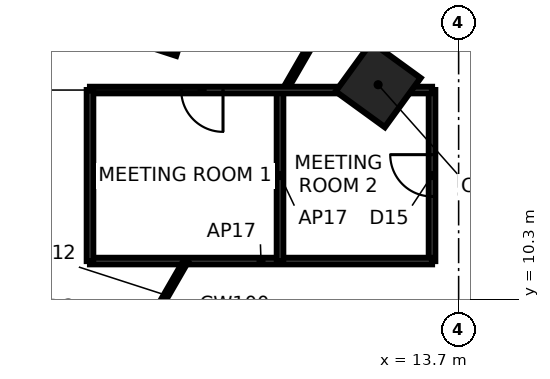
"""IFC4 building model, lengths in metres.
Left out: names, types, materials, properties, quantities, classifications, styles, units other than length and angle.
Written with IfcOpenShell. Run it as: python <this file> out.ifc"""

import sys

from ifc_helpers import new_model, si_unit, direction, frame, frame_2d, origin, origin_2d, place, context, subcontext, project, spatial, rectangle, extrude, element, fill, save


model = new_model("IFC4")
c1 = context("Model", 3, precision=1e-05, world=origin(), true_north=direction((0.0, 1.0)))
c2 = subcontext(c1, "Body", "Model", "MODEL_VIEW")
j1 = project(units=[si_unit("LENGTHUNIT", "METRE"), si_unit("PLANEANGLEUNIT", "RADIAN")], contexts=[c1])
p1 = place(None, origin())
s1 = spatial("IfcSite", under=j1, at=p1, CompositionType="ELEMENT")
p2 = place(p1, origin())
s2 = spatial("IfcBuilding", under=s1, at=p2, CompositionType="ELEMENT")
p3 = place(p2, frame((0.0, 0.0, 135.3)))
s3 = spatial("IfcBuildingStorey", under=s2, at=p3, CompositionType="ELEMENT", Elevation=135.3)
for number, where, z_axis, x_axis in (
    (1, (11.581, 15.94, 0.0), (0.0, 0.0, 1.0), (0.588, 0.809, 0.0)),
    (2, (5.754, 17.708, 0.0), (0.0, 0.0, 1.0), (0.309, 0.951, 0.0)),
):
    element("IfcColumn", number, at=place(p3, frame(where, z_axis=z_axis, x_axis=x_axis)), inside=s3, PredefinedType="COLUMN", context=c2, shape_type="SweptSolid", body=[
        extrude(rectangle(XDim=1.6, YDim=1.6, at=origin_2d()), origin(), (0.0, 0.0, 1.0), 3.9),
    ])
p4 = place(p3, frame((13.0, 11.3, 0.0), z_axis=(0.0, 0.0, 1.0), x_axis=(0.0, 1.0, 0.0)))
e3 = element("IfcWall", 3, at=p4, inside=s3, PredefinedType="PARTITIONING", context=c2, shape_type="SweptSolid", body=[
    extrude(rectangle(XDim=4.5, YDim=0.17, at=frame_2d((2.25, 0.0))), origin(), (0.0, 0.0, 1.0), 3.74),
])
p5 = place(p4, frame((1.7, 0.0, 0.0)))
e4 = element("IfcOpeningElement", 4, at=p5, cuts=e3, PredefinedType="OPENING", context=c2, shape_type="SweptSolid", body=[
    extrude(rectangle(XDim=1.1, YDim=2.4, at=frame_2d((0.55, 1.2))), frame((0.0, 0.095, 0.0), z_axis=(0.0, -1.0, 0.0), x_axis=(1.0, 0.0, 0.0)), (0.0, 0.0, 1.0), 0.19),
])
p6 = place(p3, frame((4.0, 11.3, 0.0), z_axis=(0.0, 0.0, 1.0), x_axis=(1.0, 0.0, 0.0)))
e5 = element("IfcWall", 5, at=p6, inside=s3, PredefinedType="PARTITIONING", context=c2, shape_type="SweptSolid", body=[
    extrude(rectangle(XDim=9.0, YDim=0.17, at=frame_2d((4.5, 0.0))), origin(), (0.0, 0.0, 1.0), 3.74),
])
p7 = place(p3, frame((9.0, 15.8, 0.0), z_axis=(0.0, 0.0, 1.0), x_axis=(0.0, -1.0, 0.0)))
e6 = element("IfcWall", 6, at=p7, inside=s3, PredefinedType="PARTITIONING", context=c2, shape_type="SweptSolid", body=[
    extrude(rectangle(XDim=4.5, YDim=0.17, at=frame_2d((2.25, 0.0))), origin(), (0.0, 0.0, 1.0), 3.74),
])
p8 = place(p3, frame((11.137, 19.289, 0.0), z_axis=(0.0, 0.0, 1.0), x_axis=(-0.500023174947, -0.866012023309, 0.0)))
e7 = element("IfcWall", 7, at=p8, inside=s3, PredefinedType="PARTITIONING", context=c2, shape_type="SweptSolid", body=[
    extrude(rectangle(XDim=4.029, YDim=0.12, at=frame_2d((2.015, 0.0))), origin(), (0.0, 0.0, 1.0), 3.74),
])
p9 = place(p3, frame((6.524, 11.3, 0.0), z_axis=(0.0, 0.0, 1.0), x_axis=(-0.499929208183, -0.866066271601, 0.0)))
e8 = element("IfcWall", 8, at=p9, inside=s3, PredefinedType="PARTITIONING", context=c2, shape_type="SweptSolid", body=[
    extrude(rectangle(XDim=2.078, YDim=0.12, at=frame_2d((1.039, 0.0))), origin(), (0.0, 0.0, 1.0), 3.74),
])
p10 = place(p3, frame((13.0, 15.8, 0.0), z_axis=(0.0, 0.0, 1.0), x_axis=(-1.0, 0.0, 0.0)))
e9 = element("IfcWall", 9, at=p10, inside=s3, PredefinedType="PARTITIONING", context=c2, shape_type="SweptSolid", body=[
    extrude(rectangle(XDim=9.0, YDim=0.17, at=frame_2d((4.5, 0.0))), origin(), (0.0, 0.0, 1.0), 3.74),
])
p11 = place(p10, frame((5.5, 0.0, 0.0)))
e10 = element("IfcOpeningElement", 10, at=p11, cuts=e9, PredefinedType="OPENING", context=c2, shape_type="SweptSolid", body=[
    extrude(rectangle(XDim=1.1, YDim=2.4, at=frame_2d((0.55, 1.2))), frame((0.0, 0.095, 0.0), z_axis=(0.0, -1.0, 0.0), x_axis=(1.0, 0.0, 0.0)), (0.0, 0.0, 1.0), 0.19),
])
p12 = place(p3, frame((4.0, 15.8, 0.0), z_axis=(0.0, 0.0, 1.0), x_axis=(0.0, -1.0, 0.0)))
e11 = element("IfcWall", 11, at=p12, inside=s3, PredefinedType="PARTITIONING", context=c2, shape_type="SweptSolid", body=[
    extrude(rectangle(XDim=4.5, YDim=0.17, at=frame_2d((2.25, 0.0))), origin(), (0.0, 0.0, 1.0), 3.74),
])
p13 = place(p11, origin())
e12 = element("IfcDoor", 12, at=p13, inside=s3, OperationType="SINGLE_SWING_LEFT", PredefinedType="DOOR", context=c2, shape_type="SweptSolid", body=[
    extrude(rectangle(XDim=1.1, YDim=2.4, at=frame_2d((0.55, 1.2))), frame((0.0, 0.025, 0.0), z_axis=(0.0, -1.0, 0.0), x_axis=(1.0, 0.0, 0.0)), (0.0, 0.0, 1.0), 0.05),
])
fill(e10, e12)
p14 = place(p5, origin())
e13 = element("IfcDoor", 13, at=p14, inside=s3, OperationType="SINGLE_SWING_RIGHT", PredefinedType="DOOR", context=c2, shape_type="SweptSolid", body=[
    extrude(rectangle(XDim=1.1, YDim=2.4, at=frame_2d((0.55, 1.2))), frame((0.0, 0.025, 0.0), z_axis=(0.0, -1.0, 0.0), x_axis=(1.0, 0.0, 0.0)), (0.0, 0.0, 1.0), 0.05),
])
fill(e4, e13)
save(model, sys.argv[1])
